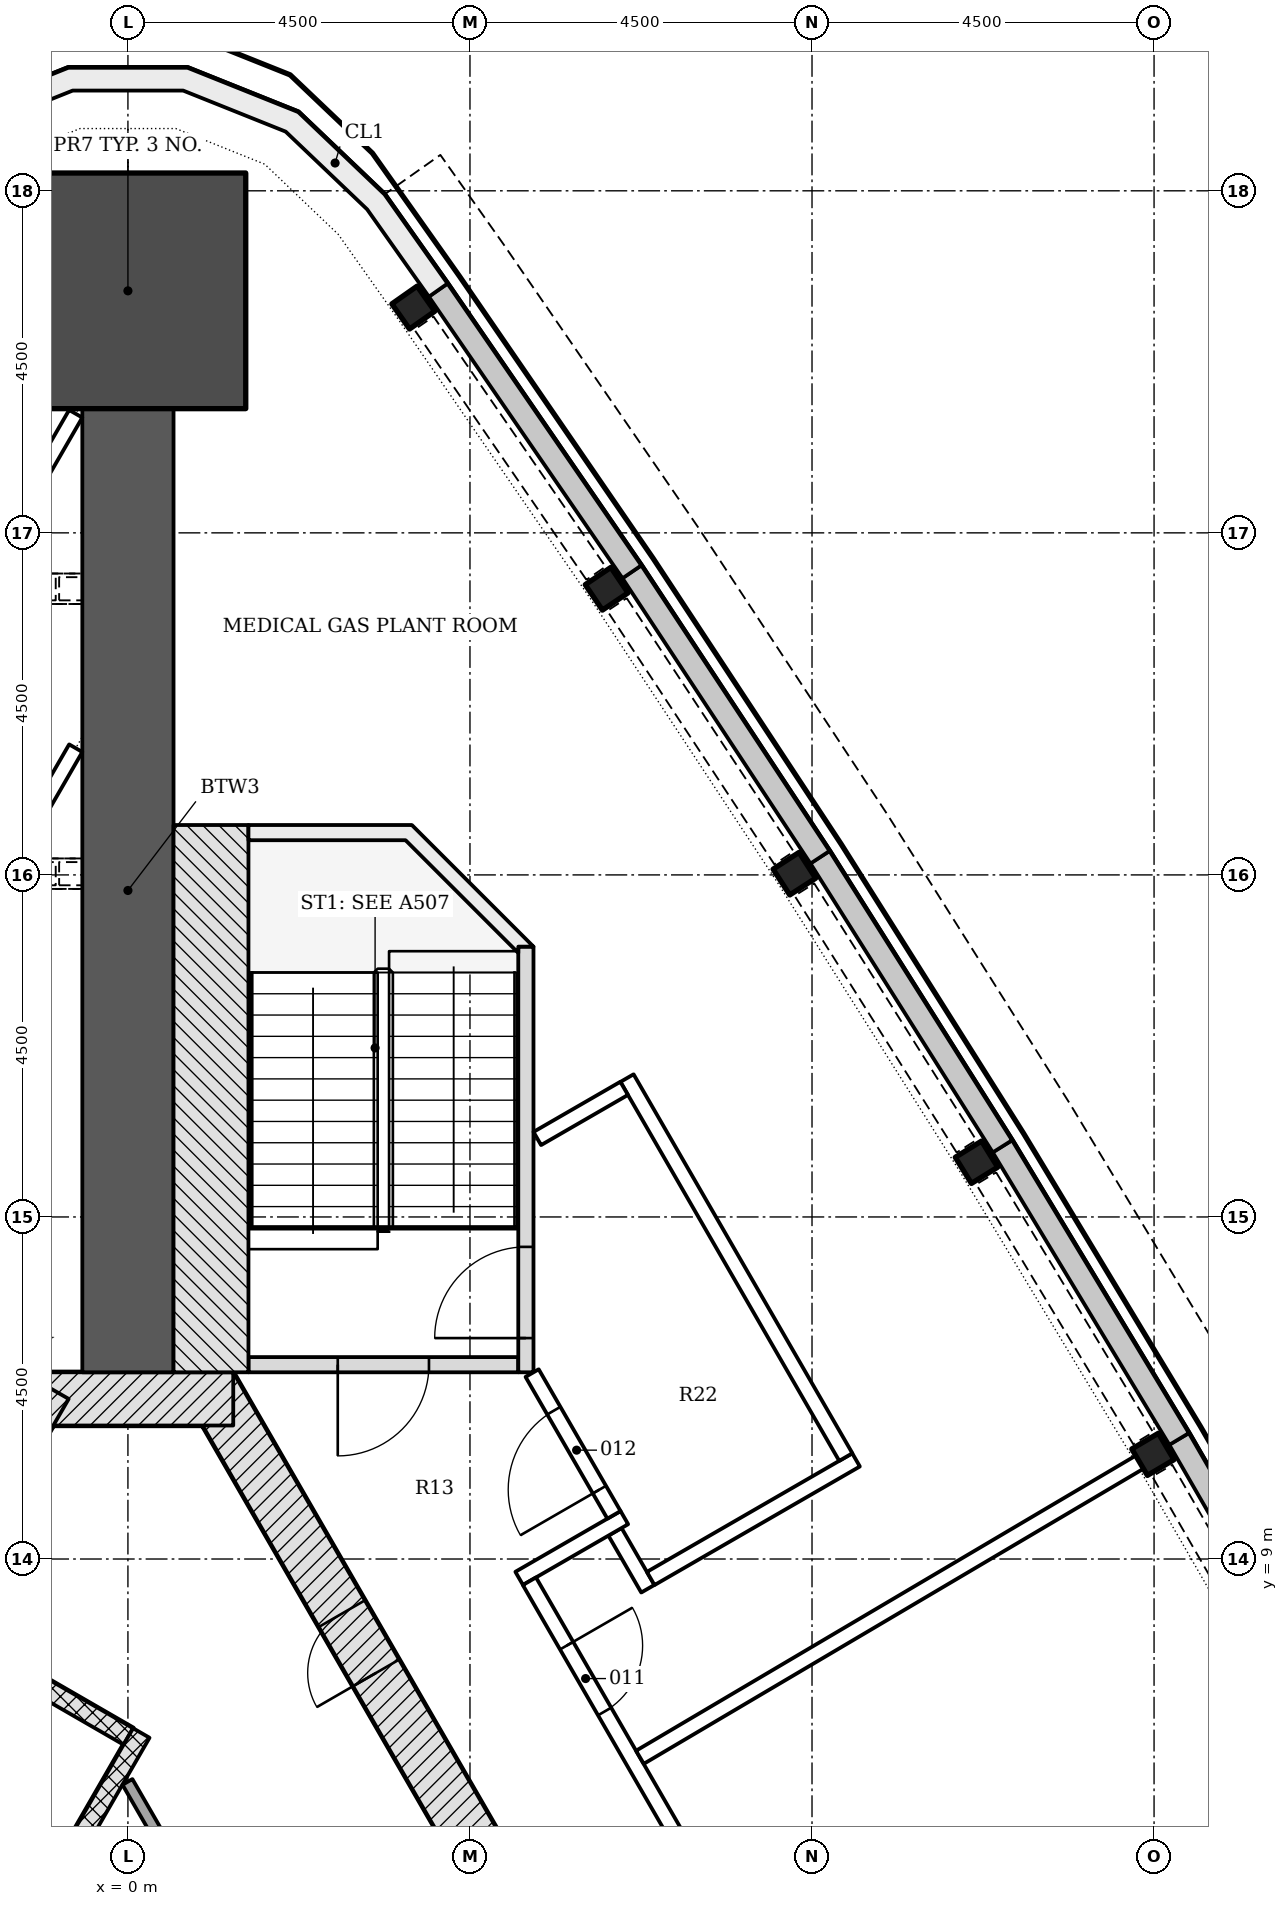
"""IFC4 building model, lengths in metres.
Left out: names, types, materials, properties, quantities, classifications, styles, units other than length and angle.
Written with IfcOpenShell. Run it as: python <this file> out.ifc"""

import sys

from ifc_helpers import new_model, si_unit, direction, frame, frame_2d, origin, origin_2d, place, context, subcontext, project, spatial, polyline, rectangle, i_section, outline, extrude, element, fill, save


model = new_model("IFC4")
c1 = context("Model", 3, precision=1e-05, world=origin(), true_north=direction((0.0, 1.0)))
c2 = subcontext(c1, "Body", "Model", "MODEL_VIEW")
j1 = project(units=[si_unit("LENGTHUNIT", "METRE"), si_unit("PLANEANGLEUNIT", "RADIAN")], contexts=[c1])
p1 = place(None, origin())
s1 = spatial("IfcSite", under=j1, at=p1, CompositionType="ELEMENT")
p2 = place(p1, origin())
s2 = spatial("IfcBuilding", under=s1, at=p2, CompositionType="ELEMENT")
p3 = place(p2, frame((0.0, 0.0, 87.0)))
s3 = spatial("IfcBuildingStorey", under=s2, at=p3, CompositionType="ELEMENT", Elevation=87.0)
p4 = place(p3, frame((10.311, -4.703, -0.3), z_axis=(0.0, 0.0, 1.0), x_axis=(-0.500001446645, 0.866024568562, 0.0)))
e1 = element("IfcWall", 1, at=p4, inside=s3, PredefinedType="SHEAR", context=c2, shape_type="SweptSolid", body=[
    extrude(rectangle(XDim=18.458, YDim=0.7, at=frame_2d((9.229, 0.0))), origin(), (0.0, 0.0, 1.0), 4.6),
])
p5 = place(p4, frame((8.7, 0.0, 0.3)))
e2 = element("IfcOpeningElement", 2, at=p5, cuts=e1, PredefinedType="OPENING", context=c2, shape_type="SweptSolid", body=[
    extrude(rectangle(XDim=1.0, YDim=2.1, at=frame_2d((0.5, 1.05))), frame((0.0, 0.36, 0.0), z_axis=(0.0, -1.0, 0.0), x_axis=(1.0, 0.0, 0.0)), (0.0, 0.0, 1.0), 0.72),
])
p6 = place(p4, frame((4.002, 0.0, 0.3)))
e3 = element("IfcOpeningElement", 3, at=p6, cuts=e1, PredefinedType="OPENING", context=c2, shape_type="SweptSolid", body=[
    extrude(rectangle(XDim=0.9, YDim=2.1, at=frame_2d((0.45, 1.05))), frame((0.0, 0.36, 0.0), z_axis=(0.0, -1.0, 0.0), x_axis=(1.0, 0.0, 0.0)), (0.0, 0.0, 1.0), 0.72),
])
p7 = place(p4, frame((14.093, 0.0, 0.3)))
e4 = element("IfcOpeningElement", 4, at=p7, cuts=e1, PredefinedType="OPENING", context=c2, shape_type="SweptSolid", body=[
    extrude(rectangle(XDim=0.9, YDim=2.1, at=frame_2d((0.45, 1.05))), frame((0.0, 0.36, 0.0), z_axis=(0.0, -1.0, 0.0), x_axis=(1.0, 0.0, 0.0)), (0.0, 0.0, 1.0), 0.72),
])
p8 = place(p3, frame((1.386, 11.106, -0.3), z_axis=(0.0, 0.0, 1.0), x_axis=(-1.0, 0.0, 0.0)))
e5 = element("IfcWall", 5, at=p8, inside=s3, PredefinedType="SHEAR", context=c2, shape_type="SweptSolid", body=[
    extrude(rectangle(XDim=2.771, YDim=0.7, at=frame_2d((1.386, 0.0))), origin(), (0.0, 0.0, 1.0), 4.6),
])
p9 = place(p3, frame((-1.083, 11.281, -0.3), z_axis=(0.0, 0.0, 1.0), x_axis=(-0.500001446645, -0.866024568562, 0.0)))
e6 = element("IfcWall", 6, at=p9, inside=s3, PredefinedType="SHEAR", context=c2, shape_type="SweptSolid", body=[
    extrude(rectangle(XDim=18.458, YDim=0.7, at=frame_2d((9.229, 0.0))), origin(), (0.0, 0.0, 1.0), 4.6),
])
p10 = place(p9, frame((8.979, 0.0, 0.3)))
e7 = element("IfcOpeningElement", 7, at=p10, cuts=e6, PredefinedType="OPENING", context=c2, shape_type="SweptSolid", body=[
    extrude(rectangle(XDim=1.2, YDim=2.1, at=frame_2d((0.6, 1.05))), frame((0.0, 0.36, 0.0), z_axis=(0.0, -1.0, 0.0), x_axis=(1.0, 0.0, 0.0)), (0.0, 0.0, 1.0), 0.72),
])
p11 = place(p9, frame((11.029, 0.0, 0.3)))
e8 = element("IfcOpeningElement", 8, at=p11, cuts=e6, PredefinedType="OPENING", context=c2, shape_type="SweptSolid", body=[
    extrude(rectangle(XDim=1.2, YDim=2.1, at=frame_2d((0.6, 1.05))), frame((0.0, 0.36, 0.0), z_axis=(0.0, -1.0, 0.0), x_axis=(1.0, 0.0, 0.0)), (0.0, 0.0, 1.0), 0.72),
])
p12 = place(p3, frame((0.0, 11.456, -0.3), z_axis=(0.0, 0.0, 1.0), x_axis=(0.0, 1.0, 0.0)))
e9 = element("IfcWall", 9, at=p12, inside=s3, PredefinedType="SHEAR", context=c2, shape_type="SweptSolid", body=[
    extrude(rectangle(XDim=12.678, YDim=1.2, at=frame_2d((6.339, 0.0))), origin(), (0.0, 0.0, 1.0), 4.6),
])
p13 = place(p3, frame((0.0, 25.684, -0.3), z_axis=(0.0, 0.0, 1.0), x_axis=(0.0, 1.0, 0.0)))
e10 = element("IfcColumn", 10, at=p13, inside=s3, PredefinedType="COLUMN", context=c2, shape_type="SweptSolid", body=[
    extrude(rectangle(XDim=3.1, YDim=3.1, at=origin_2d()), origin(), (0.0, 0.0, 1.0), 4.6),
])
for number, where, z_axis, x_axis in (
    (11, (13.484, 10.377, -0.3), (0.0, 0.0, 1.0), (-0.508, 0.861, 0.0)),
    (12, (11.164, 14.22, -0.3), (0.0, 0.0, 1.0), (-0.525, 0.851, 0.0)),
    (13, (8.768, 18.016, -0.3), (0.0, 0.0, 1.0), (-0.542, 0.84, 0.0)),
    (14, (6.298, 21.765, -0.3), (0.0, 0.0, 1.0), (-0.558, 0.83, 0.0)),
    (15, (3.755, 25.464, -0.3), (0.0, 0.0, 1.0), (-0.575, 0.818, 0.0)),
):
    element("IfcColumn", number, at=place(p3, frame(where, z_axis=z_axis, x_axis=x_axis)), inside=s3, PredefinedType="COLUMN", context=c2, shape_type="SweptSolid", body=[
        extrude(i_section(OverallWidth=0.404, OverallDepth=0.406, WebThickness=0.027, FlangeThickness=0.044, FilletRadius=0.015, at=origin_2d()), origin(), (0.0, 0.0, 1.0), 4.6),
    ])
p14 = place(p3, origin())
e16 = element("IfcWall", 16, at=p14, inside=s3, PredefinedType="NOTDEFINED", context=c2, shape_type="SweptSolid", body=[
    extrude(outline(polyline([(16.208, 6.76), (13.958, 10.657), (13.698, 10.507), (15.948, 6.61), (16.208, 6.76)])), origin(), (0.0, 0.0, 1.0), 1.2),
])
p15 = place(p3, origin())
e17 = element("IfcWall", 17, at=p15, inside=s3, PredefinedType="NOTDEFINED", context=c2, shape_type="SweptSolid", body=[
    extrude(outline(polyline([(13.958, 10.657), (11.632, 14.509), (11.375, 14.354), (13.701, 10.502), (13.958, 10.657)])), origin(), (0.0, 0.0, 1.0), 1.2),
])
p16 = place(p3, origin())
e18 = element("IfcWall", 18, at=p16, inside=s3, PredefinedType="NOTDEFINED", context=c2, shape_type="SweptSolid", body=[
    extrude(outline(polyline([(11.632, 14.509), (9.23, 18.314), (8.977, 18.154), (11.378, 14.349), (11.632, 14.509)])), origin(), (0.0, 0.0, 1.0), 1.2),
])
p17 = place(p3, origin())
e19 = element("IfcWall", 19, at=p17, inside=s3, PredefinedType="NOTDEFINED", context=c2, shape_type="SweptSolid", body=[
    extrude(outline(polyline([(9.23, 18.314), (6.754, 22.072), (6.504, 21.907), (8.98, 18.149), (9.23, 18.314)])), origin(), (0.0, 0.0, 1.0), 1.2),
])
p18 = place(p3, origin())
e20 = element("IfcWall", 20, at=p18, inside=s3, PredefinedType="NOTDEFINED", context=c2, shape_type="SweptSolid", body=[
    extrude(outline(polyline([(6.754, 22.072), (4.205, 25.78), (3.958, 25.61), (6.507, 21.902), (6.754, 22.072)])), origin(), (0.0, 0.0, 1.0), 1.2),
])
p19 = place(p3, origin())
e21 = element("IfcWall", 21, at=p19, inside=s3, PredefinedType="NOTDEFINED", context=c2, shape_type="SweptSolid", body=[
    extrude(outline(polyline([(4.205, 25.78), (3.375, 26.953), (2.24, 28.035), (0.784, 28.619), (-0.784, 28.619), (-2.24, 28.035), (-3.375, 26.953), (-3.168, 26.736), (-2.075, 27.779), (-0.727, 28.319), (0.727, 28.319), (2.075, 27.779), (3.147, 26.756), (3.96, 25.606), (4.205, 25.78)])), origin(), (0.0, 0.0, 1.0), 4.3),
])
p20 = place(p3, frame((-2.506, 8.115, -0.3), z_axis=(0.0, 0.0, 1.0), x_axis=(0.865996321171, -0.50005036918, 0.0)))
e22 = element("IfcWall", 22, at=p20, inside=s3, PredefinedType="PARTITIONING", context=c2, shape_type="SweptSolid", body=[
    extrude(rectangle(XDim=2.9, YDim=0.25, at=frame_2d((1.45, 0.0))), origin(), (0.0, 0.0, 1.0), 4.6),
])
p21 = place(p3, frame((0.176, 6.711, 0.0), z_axis=(0.0, 0.0, 1.0), x_axis=(-0.500004227369, -0.866022963098, 0.0)))
e23 = element("IfcWall", 23, at=p21, inside=s3, PredefinedType="PARTITIONING", context=c2, shape_type="SweptSolid", body=[
    extrude(rectangle(XDim=11.8, YDim=0.25, at=frame_2d((5.9, 0.0))), origin(), (0.0, 0.0, 1.0), 4.3),
])
p22 = place(p3, frame((2.099, 2.42, 0.0), z_axis=(0.0, 0.0, 1.0), x_axis=(-0.499998449073, 0.866026299211, 0.0)))
e24 = element("IfcWall", 24, at=p22, inside=s3, PredefinedType="PARTITIONING", context=c2, shape_type="SweptSolid", body=[
    extrude(rectangle(XDim=4.211, YDim=0.15, at=frame_2d((2.106, 0.0))), origin(), (0.0, 0.0, 1.0), 4.3),
])
p23 = place(p3, frame((5.135, 11.556, -0.3), z_axis=(0.0, 0.0, 1.0), x_axis=(-1.0, 0.0, 0.0)))
e25 = element("IfcWall", 25, at=p23, inside=s3, PredefinedType="SHEAR", context=c2, shape_type="SweptSolid", body=[
    extrude(rectangle(XDim=3.55, YDim=0.2, at=frame_2d((1.775, 0.0))), origin(), (0.0, 0.0, 1.0), 4.6),
])
p24 = place(p23, frame((1.175, 0.0, 0.3)))
e26 = element("IfcOpeningElement", 26, at=p24, cuts=e25, PredefinedType="OPENING", context=c2, shape_type="SweptSolid", body=[
    extrude(rectangle(XDim=1.2, YDim=2.1, at=frame_2d((0.6, 1.05))), frame((0.0, 0.11, 0.0), z_axis=(0.0, -1.0, 0.0), x_axis=(1.0, 0.0, 0.0)), (0.0, 0.0, 1.0), 0.22),
])
p25 = place(p3, frame((5.236, 11.456, -0.3), z_axis=(0.0, 0.0, 1.0), x_axis=(0.0, 1.0, 0.0)))
e27 = element("IfcWall", 27, at=p25, inside=s3, PredefinedType="SHEAR", context=c2, shape_type="SweptSolid", body=[
    extrude(rectangle(XDim=5.6, YDim=0.2, at=frame_2d((2.8, 0.0))), origin(), (0.0, 0.0, 1.0), 4.6),
])
p26 = place(p25, frame((0.45, 0.0, 0.3)))
e28 = element("IfcOpeningElement", 28, at=p26, cuts=e27, PredefinedType="OPENING", context=c2, shape_type="SweptSolid", body=[
    extrude(rectangle(XDim=1.2, YDim=2.1, at=frame_2d((0.6, 1.05))), frame((0.0, 0.11, 0.0), z_axis=(0.0, -1.0, 0.0), x_axis=(1.0, 0.0, 0.0)), (0.0, 0.0, 1.0), 0.22),
])
p27 = place(p3, frame((1.093, 11.456, -0.3), z_axis=(0.0, 0.0, 1.0), x_axis=(0.0, 1.0, 0.0)))
e29 = element("IfcWall", 29, at=p27, inside=s3, PredefinedType="SHEAR", context=c2, shape_type="SweptSolid", body=[
    extrude(rectangle(XDim=7.2, YDim=0.986, at=frame_2d((3.6, 0.0))), origin(), (0.0, 0.0, 1.0), 4.6),
])
p28 = place(p3, frame((0.0, 0.0, -0.3)))
e30 = element("IfcWall", 30, at=p28, inside=s3, PredefinedType="SHEAR", context=c2, shape_type="SweptSolid", body=[
    extrude(outline(polyline([(5.336, 17.056), (3.736, 18.656), (1.586, 18.656), (1.586, 18.456), (3.653, 18.456), (5.135, 16.974), (5.135, 17.056), (5.135, 17.056), (5.135, 17.056), (5.135, 17.056), (5.135, 17.056), (5.135, 17.056), (5.135, 17.056), (5.135, 17.056), (5.135, 17.056), (5.135, 17.056), (5.135, 17.056), (5.135, 17.056), (5.135, 17.056), (5.135, 17.056), (5.135, 17.056), (5.135, 17.056), (5.135, 17.056), (5.336, 17.056)])), origin(), (0.0, 0.0, 1.0), 4.6),
])
p29 = place(p3, frame((-0.687, 19.667, 0.0), z_axis=(0.0, 0.0, 1.0), x_axis=(-0.500000491645, -0.866025119933, 0.0)))
e31 = element("IfcWall", 31, at=p29, inside=s3, PredefinedType="PARTITIONING", context=c2, shape_type="SweptSolid", body=[
    extrude(rectangle(XDim=23.943, YDim=0.2, at=frame_2d((11.971, 0.0))), origin(), (0.0, 0.0, 1.0), 3.678),
])
p30 = place(p29, frame((16.287, 0.0, 0.0)))
e32 = element("IfcOpeningElement", 32, at=p30, cuts=e31, PredefinedType="OPENING", context=c2, shape_type="SweptSolid", body=[
    extrude(rectangle(XDim=1.2, YDim=2.1, at=frame_2d((0.6, 1.05))), frame((0.0, 0.11, 0.0), z_axis=(0.0, -1.0, 0.0), x_axis=(1.0, 0.0, 0.0)), (0.0, 0.0, 1.0), 0.22),
])
p31 = place(p3, frame((-16.45, -3.237, 0.0), z_axis=(0.0, 0.0, 1.0), x_axis=(0.499997734893, 0.866026711541, 0.0)))
e33 = element("IfcWall", 33, at=p31, inside=s3, PredefinedType="PARTITIONING", context=c2, shape_type="SweptSolid", body=[
    extrude(rectangle(XDim=31.527, YDim=0.2, at=frame_2d((15.764, 0.0))), origin(), (0.0, 0.0, 1.0), 3.678),
])
p32 = place(p31, frame((19.615, 0.0, 0.0)))
e34 = element("IfcOpeningElement", 34, at=p32, cuts=e33, PredefinedType="OPENING", context=c2, shape_type="SweptSolid", body=[
    extrude(rectangle(XDim=1.0, YDim=2.1, at=frame_2d((0.5, 1.05))), frame((0.0, 0.11, 0.0), z_axis=(0.0, -1.0, 0.0), x_axis=(1.0, 0.0, 0.0)), (0.0, 0.0, 1.0), 0.22),
])
p33 = place(p31, frame((1.828, 0.0, 0.0)))
e35 = element("IfcOpeningElement", 35, at=p33, cuts=e33, PredefinedType="OPENING", context=c2, shape_type="SweptSolid", body=[
    extrude(rectangle(XDim=1.0, YDim=2.1, at=frame_2d((0.5, 1.05))), frame((0.0, 0.11, 0.0), z_axis=(0.0, -1.0, 0.0), x_axis=(1.0, 0.0, 0.0)), (0.0, 0.0, 1.0), 0.22),
])
p34 = place(p3, frame((6.408, 9.358, 0.0), z_axis=(0.0, 0.0, 1.0), x_axis=(0.49996696679, -0.866044474677, 0.0)))
e36 = element("IfcWall", 36, at=p34, inside=s3, PredefinedType="PARTITIONING", context=c2, shape_type="SweptSolid", body=[
    extrude(rectangle(XDim=0.864, YDim=0.2, at=frame_2d((0.432, 0.0))), origin(), (0.0, 0.0, 1.0), 4.3),
])
p35 = place(p3, frame((5.147, 8.745, 0.0), z_axis=(0.0, 0.0, 1.0), x_axis=(0.865987117328, 0.500066308224, 0.0)))
e37 = element("IfcWall", 37, at=p35, inside=s3, PredefinedType="PARTITIONING", context=c2, shape_type="SweptSolid", body=[
    extrude(rectangle(XDim=1.598, YDim=0.2, at=frame_2d((0.799, 0.0))), origin(), (0.0, 0.0, 1.0), 4.3),
])
p36 = place(p3, frame((6.395, 9.581, 0.0), z_axis=(0.0, 0.0, 1.0), x_axis=(-0.500003735859, 0.866023246874, 0.0)))
e38 = element("IfcWall", 38, at=p36, inside=s3, PredefinedType="PARTITIONING", context=c2, shape_type="SweptSolid", body=[
    extrude(rectangle(XDim=2.154, YDim=0.2, at=frame_2d((1.077, 0.0))), origin(), (0.0, 0.0, 1.0), 3.678),
])
p37 = place(p36, frame((0.383, 0.0, 0.0)))
e39 = element("IfcOpeningElement", 39, at=p37, cuts=e38, PredefinedType="OPENING", context=c2, shape_type="SweptSolid", body=[
    extrude(rectangle(XDim=1.2, YDim=2.1, at=frame_2d((0.6, 1.05))), frame((0.0, 0.11, 0.0), z_axis=(0.0, -1.0, 0.0), x_axis=(1.0, 0.0, 0.0)), (0.0, 0.0, 1.0), 0.22),
])
p38 = place(p3, frame((5.282, 8.708, 0.0), z_axis=(0.0, 0.0, 1.0), x_axis=(0.500007704848, -0.866020955343, 0.0)))
e40 = element("IfcWall", 40, at=p38, inside=s3, PredefinedType="PARTITIONING", context=c2, shape_type="SweptSolid", body=[
    extrude(rectangle(XDim=18.991, YDim=0.2, at=frame_2d((9.496, 0.0))), origin(), (0.0, 0.0, 1.0), 3.678),
])
p39 = place(p38, frame((14.783, 0.0, 0.0)))
e41 = element("IfcOpeningElement", 41, at=p39, cuts=e40, PredefinedType="OPENING", context=c2, shape_type="SweptSolid", body=[
    extrude(rectangle(XDim=1.0, YDim=2.1, at=frame_2d((0.5, 1.05))), frame((0.0, 0.11, 0.0), z_axis=(0.0, -1.0, 0.0), x_axis=(1.0, 0.0, 0.0)), (0.0, 0.0, 1.0), 0.22),
])
p40 = place(p38, frame((6.567, 0.0, 0.0)))
e42 = element("IfcOpeningElement", 42, at=p40, cuts=e40, PredefinedType="OPENING", context=c2, shape_type="SweptSolid", body=[
    extrude(rectangle(XDim=1.0, YDim=2.1, at=frame_2d((0.5, 1.05))), frame((0.0, 0.11, 0.0), z_axis=(0.0, -1.0, 0.0), x_axis=(1.0, 0.0, 0.0)), (0.0, 0.0, 1.0), 0.22),
])
p41 = place(p38, frame((0.979, 0.0, 0.0)))
e43 = element("IfcOpeningElement", 43, at=p41, cuts=e40, PredefinedType="OPENING", context=c2, shape_type="SweptSolid", body=[
    extrude(rectangle(XDim=1.0, YDim=2.1, at=frame_2d((0.5, 1.05))), frame((0.0, 0.11, 0.0), z_axis=(0.0, -1.0, 0.0), x_axis=(1.0, 0.0, 0.0)), (0.0, 0.0, 1.0), 0.22),
])
p42 = place(p3, frame((6.736, 6.392, 0.0), z_axis=(0.0, 0.0, 1.0), x_axis=(0.861056110095, 0.508509955919, 0.0)))
e44 = element("IfcWall", 44, at=p42, inside=s3, PredefinedType="PARTITIONING", context=c2, shape_type="SweptSolid", body=[
    extrude(rectangle(XDim=7.688, YDim=0.2, at=frame_2d((3.844, 0.0))), origin(), (0.0, 0.0, 1.0), 3.678),
])
p43 = place(p3, frame((6.878, 8.744, 0.0), z_axis=(0.0, 0.0, 1.0), x_axis=(0.866023983177, 0.500002460556, 0.0)))
e45 = element("IfcWall", 45, at=p43, inside=s3, PredefinedType="PARTITIONING", context=c2, shape_type="SweptSolid", body=[
    extrude(rectangle(XDim=3.12, YDim=0.2, at=frame_2d((1.56, 0.0))), origin(), (0.0, 0.0, 1.0), 4.3),
])
p44 = place(p3, frame((6.566, 15.327, 0.0), z_axis=(0.0, 0.0, 1.0), x_axis=(0.499997778408, -0.866026686418, 0.0)))
e46 = element("IfcWall", 46, at=p44, inside=s3, PredefinedType="PARTITIONING", context=c2, shape_type="SweptSolid", body=[
    extrude(rectangle(XDim=5.757, YDim=0.2, at=frame_2d((2.878, 0.0))), origin(), (0.0, 0.0, 1.0), 3.678),
])
p45 = place(p3, frame((6.529, 15.192, 0.0), z_axis=(0.0, 0.0, 1.0), x_axis=(-0.866117824122, -0.499839889103, 0.0)))
e47 = element("IfcWall", 47, at=p45, inside=s3, PredefinedType="PARTITIONING", context=c2, shape_type="SweptSolid", body=[
    extrude(rectangle(XDim=1.32, YDim=0.2, at=frame_2d((0.66, 0.0))), origin(), (0.0, 0.0, 1.0), 4.3),
])
p46 = place(p7, origin())
e48 = element("IfcDoor", 48, at=p46, inside=s3, OperationType="SINGLE_SWING_LEFT", PredefinedType="DOOR", context=c2, shape_type="SweptSolid", body=[
    extrude(rectangle(XDim=0.9, YDim=2.1, at=frame_2d((0.45, 1.05))), frame((0.0, 0.075, 0.0), z_axis=(0.0, -1.0, 0.0), x_axis=(1.0, 0.0, 0.0)), (0.0, 0.0, 1.0), 0.15),
])
fill(e4, e48)
p47 = place(p24, origin())
e49 = element("IfcDoor", 49, at=p47, inside=s3, OperationType="SINGLE_SWING_RIGHT", PredefinedType="DOOR", context=c2, shape_type="SweptSolid", body=[
    extrude(rectangle(XDim=1.2, YDim=2.1, at=frame_2d((0.6, 1.05))), frame((0.0, 0.025, 0.0), z_axis=(0.0, -1.0, 0.0), x_axis=(1.0, 0.0, 0.0)), (0.0, 0.0, 1.0), 0.05),
])
fill(e26, e49)
p48 = place(p26, origin())
e50 = element("IfcDoor", 50, at=p48, inside=s3, OperationType="SINGLE_SWING_LEFT", PredefinedType="DOOR", context=c2, shape_type="SweptSolid", body=[
    extrude(rectangle(XDim=1.2, YDim=2.1, at=frame_2d((0.6, 1.05))), frame((0.0, 0.025, 0.0), z_axis=(0.0, -1.0, 0.0), x_axis=(1.0, 0.0, 0.0)), (0.0, 0.0, 1.0), 0.05),
])
fill(e28, e50)
p49 = place(p41, origin())
e51 = element("IfcDoor", 51, at=p49, inside=s3, OperationType="SINGLE_SWING_LEFT", PredefinedType="DOOR", context=c2, shape_type="SweptSolid", body=[
    extrude(rectangle(XDim=1.0, YDim=2.1, at=frame_2d((0.5, 1.05))), frame((0.0, 0.025, 0.0), z_axis=(0.0, -1.0, 0.0), x_axis=(1.0, 0.0, 0.0)), (0.0, 0.0, 1.0), 0.05),
])
fill(e43, e51)
p50 = place(p37, origin())
e52 = element("IfcDoor", 52, at=p50, inside=s3, OperationType="SINGLE_SWING_LEFT", PredefinedType="DOOR", context=c2, shape_type="SweptSolid", body=[
    extrude(rectangle(XDim=1.2, YDim=2.1, at=frame_2d((0.6, 1.05))), frame((0.0, 0.025, 0.0), z_axis=(0.0, -1.0, 0.0), x_axis=(1.0, 0.0, 0.0)), (0.0, 0.0, 1.0), 0.05),
])
fill(e39, e52)
save(model, sys.argv[1])
